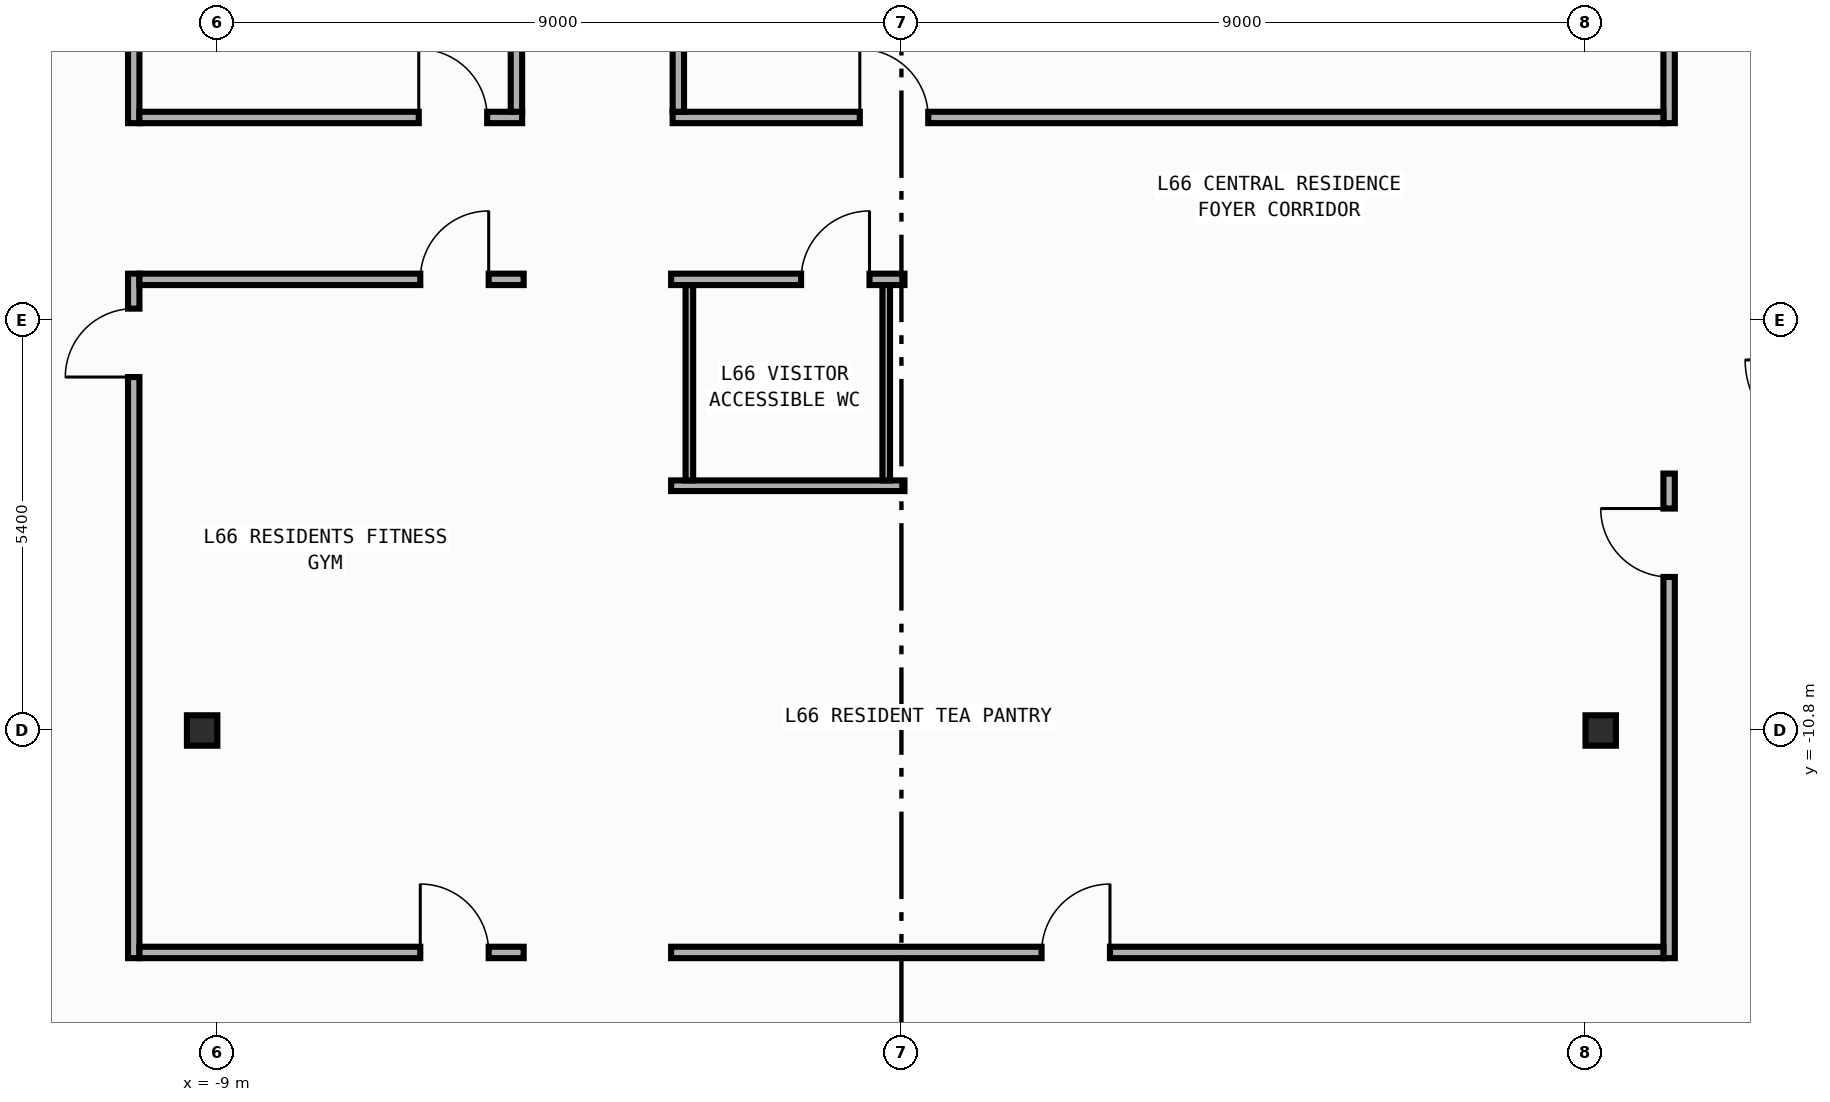
"""IFC4 building model, lengths in metres.
Left out: names, types, materials, properties, quantities, classifications, styles, units other than length and angle.
Written with IfcOpenShell. Run it as: python <this file> out.ifc"""

import sys

from ifc_helpers import new_model, si_unit, direction, frame, frame_2d, origin, origin_2d, place, context, subcontext, project, spatial, rectangle, i_section, extrude, element, fill, save


model = new_model("IFC4")
c1 = context("Model", 3, precision=1e-05, world=origin(), true_north=direction((0.0, 1.0)))
c2 = subcontext(c1, "Body", "Model", "MODEL_VIEW")
j1 = project(units=[si_unit("LENGTHUNIT", "METRE"), si_unit("PLANEANGLEUNIT", "RADIAN")], contexts=[c1])
p1 = place(None, origin())
s1 = spatial("IfcSite", under=j1, at=p1, CompositionType="ELEMENT")
p2 = place(p1, origin())
s2 = spatial("IfcBuilding", under=s1, at=p2, CompositionType="ELEMENT")
p3 = place(p2, frame((0.0, 0.0, 277.6)))
s3 = spatial("IfcBuildingStorey", under=s2, at=p3, CompositionType="ELEMENT", Elevation=277.6)
for number, where, z_axis, x_axis in (
    (1, (-9.2, -10.8, 0.0), (0.0, 0.0, 1.0), (1.0, 0.0, 0.0)),
    (2, (9.2, -10.8, 0.0), (0.0, 0.0, 1.0), (1.0, 0.0, 0.0)),
):
    element("IfcColumn", number, at=place(p3, frame(where, z_axis=z_axis, x_axis=x_axis)), inside=s3, PredefinedType="COLUMN", context=c2, shape_type="SweptSolid", body=[
        extrude(i_section(OverallWidth=0.4, OverallDepth=0.4, WebThickness=0.013, FlangeThickness=0.021, FilletRadius=0.022, at=origin_2d()), origin(), (0.0, 0.0, 1.0), 3.8),
    ])
p4 = place(p3, frame((-10.1, -2.81, 0.0), z_axis=(0.0, 0.0, 1.0), x_axis=(0.0, 1.0, 0.0)))
e3 = element("IfcWall", 3, at=p4, inside=s3, PredefinedType="PARTITIONING", context=c2, shape_type="SweptSolid", body=[
    extrude(rectangle(XDim=16.605, YDim=0.15, at=frame_2d((8.302, 0.0))), origin(), (0.0, 0.0, 1.0), 3.54),
])
p5 = place(p4, frame((7.751, 0.0, 0.0)))
e4 = element("IfcOpeningElement", 4, at=p5, cuts=e3, PredefinedType="OPENING", context=c2, shape_type="SweptSolid", body=[
    extrude(rectangle(XDim=0.9, YDim=2.15, at=frame_2d((0.45, 1.075))), frame((0.0, 0.085, 0.0), z_axis=(0.0, -1.0, 0.0), x_axis=(1.0, 0.0, 0.0)), (0.0, 0.0, 1.0), 0.17),
])
p6 = place(p3, frame((-10.1, -13.795, 0.0), z_axis=(0.0, 0.0, 1.0), x_axis=(0.0, 1.0, 0.0)))
e5 = element("IfcWall", 5, at=p6, inside=s3, PredefinedType="PARTITIONING", context=c2, shape_type="SweptSolid", body=[
    extrude(rectangle(XDim=9.005, YDim=0.15, at=frame_2d((4.502, 0.0))), origin(), (0.0, 0.0, 1.0), 3.54),
])
p7 = place(p6, frame((7.645, 0.0, 0.0)))
e6 = element("IfcOpeningElement", 6, at=p7, cuts=e5, PredefinedType="OPENING", context=c2, shape_type="SweptSolid", body=[
    extrude(rectangle(XDim=0.9, YDim=2.15, at=frame_2d((0.45, 1.075))), frame((0.0, 0.085, 0.0), z_axis=(0.0, -1.0, 0.0), x_axis=(1.0, 0.0, 0.0)), (0.0, 0.0, 1.0), 0.17),
])
p8 = place(p3, frame((10.1, -2.81, 0.0), z_axis=(0.0, 0.0, 1.0), x_axis=(0.0, 1.0, 0.0)))
e7 = element("IfcWall", 7, at=p8, inside=s3, PredefinedType="PARTITIONING", context=c2, shape_type="SweptSolid", body=[
    extrude(rectangle(XDim=16.69, YDim=0.15, at=frame_2d((8.345, 0.0))), origin(), (0.0, 0.0, 1.0), 3.54),
])
p9 = place(p8, frame((7.694, 0.0, 0.0)))
e8 = element("IfcOpeningElement", 8, at=p9, cuts=e7, PredefinedType="OPENING", context=c2, shape_type="SweptSolid", body=[
    extrude(rectangle(XDim=0.9, YDim=2.15, at=frame_2d((0.45, 1.075))), frame((0.0, 0.085, 0.0), z_axis=(0.0, -1.0, 0.0), x_axis=(1.0, 0.0, 0.0)), (0.0, 0.0, 1.0), 0.17),
])
p10 = place(p3, frame((10.1, -13.795, 0.0), z_axis=(0.0, 0.0, 1.0), x_axis=(0.0, 1.0, 0.0)))
e9 = element("IfcWall", 9, at=p10, inside=s3, PredefinedType="PARTITIONING", context=c2, shape_type="SweptSolid", body=[
    extrude(rectangle(XDim=6.375, YDim=0.15, at=frame_2d((3.188, 0.0))), origin(), (0.0, 0.0, 1.0), 3.54),
])
p11 = place(p10, frame((5.015, 0.0, 0.0)))
e10 = element("IfcOpeningElement", 10, at=p11, cuts=e9, PredefinedType="OPENING", context=c2, shape_type="SweptSolid", body=[
    extrude(rectangle(XDim=0.9, YDim=2.15, at=frame_2d((0.45, 1.075))), frame((0.0, 0.085, 0.0), z_axis=(0.0, -1.0, 0.0), x_axis=(1.0, 0.0, 0.0)), (0.0, 0.0, 1.0), 0.17),
])
p12 = place(p3, frame((-10.025, -2.735, 0.0), z_axis=(0.0, 0.0, 1.0), x_axis=(1.0, 0.0, 0.0)))
e11 = element("IfcWall", 11, at=p12, inside=s3, PredefinedType="PARTITIONING", context=c2, shape_type="SweptSolid", body=[
    extrude(rectangle(XDim=5.035, YDim=0.15, at=frame_2d((2.518, 0.0))), origin(), (0.0, 0.0, 1.0), 3.54),
])
p13 = place(p12, frame((3.675, 0.0, 0.0)))
e12 = element("IfcOpeningElement", 12, at=p13, cuts=e11, PredefinedType="OPENING", context=c2, shape_type="SweptSolid", body=[
    extrude(rectangle(XDim=0.9, YDim=2.15, at=frame_2d((0.45, 1.075))), frame((0.0, 0.085, 0.0), z_axis=(0.0, -1.0, 0.0), x_axis=(1.0, 0.0, 0.0)), (0.0, 0.0, 1.0), 0.17),
])
p14 = place(p3, frame((-10.025, -4.865, 0.0), z_axis=(0.0, 0.0, 1.0), x_axis=(1.0, 0.0, 0.0)))
e13 = element("IfcWall", 13, at=p14, inside=s3, PredefinedType="PARTITIONING", context=c2, shape_type="SweptSolid", body=[
    extrude(rectangle(XDim=5.055, YDim=0.15, at=frame_2d((2.527, 0.0))), origin(), (0.0, 0.0, 1.0), 3.54),
])
p15 = place(p14, frame((3.695, 0.0, 0.0)))
e14 = element("IfcOpeningElement", 14, at=p15, cuts=e13, PredefinedType="OPENING", context=c2, shape_type="SweptSolid", body=[
    extrude(rectangle(XDim=0.9, YDim=2.15, at=frame_2d((0.45, 1.075))), frame((0.0, 0.085, 0.0), z_axis=(0.0, -1.0, 0.0), x_axis=(1.0, 0.0, 0.0)), (0.0, 0.0, 1.0), 0.17),
])
p16 = place(p3, frame((-3.01, -2.735, 0.0), z_axis=(0.0, 0.0, 1.0), x_axis=(1.0, 0.0, 0.0)))
e15 = element("IfcWall", 15, at=p16, inside=s3, PredefinedType="PARTITIONING", context=c2, shape_type="SweptSolid", body=[
    extrude(rectangle(XDim=13.035, YDim=0.15, at=frame_2d((6.518, 0.0))), origin(), (0.0, 0.0, 1.0), 3.54),
])
p17 = place(p16, frame((2.463, 0.0, 0.0)))
e16 = element("IfcOpeningElement", 16, at=p17, cuts=e15, PredefinedType="OPENING", context=c2, shape_type="SweptSolid", body=[
    extrude(rectangle(XDim=0.9, YDim=2.15, at=frame_2d((0.45, 1.075))), frame((0.0, 0.085, 0.0), z_axis=(0.0, -1.0, 0.0), x_axis=(1.0, 0.0, 0.0)), (0.0, 0.0, 1.0), 0.17),
])
p18 = place(p3, frame((-3.03, -4.865, 0.0), z_axis=(0.0, 0.0, 1.0), x_axis=(1.0, 0.0, 0.0)))
e17 = element("IfcWall", 17, at=p18, inside=s3, PredefinedType="PARTITIONING", context=c2, shape_type="SweptSolid", body=[
    extrude(rectangle(XDim=3.07, YDim=0.15, at=frame_2d((1.535, 0.0))), origin(), (0.0, 0.0, 1.0), 3.54),
])
p19 = place(p18, frame((1.71, 0.0, 0.0)))
e18 = element("IfcOpeningElement", 18, at=p19, cuts=e17, PredefinedType="OPENING", context=c2, shape_type="SweptSolid", body=[
    extrude(rectangle(XDim=0.9, YDim=2.15, at=frame_2d((0.45, 1.075))), frame((0.0, 0.085, 0.0), z_axis=(0.0, -1.0, 0.0), x_axis=(1.0, 0.0, 0.0)), (0.0, 0.0, 1.0), 0.17),
])
p20 = place(p3, frame((-5.065, -2.66, 0.0), z_axis=(0.0, 0.0, 1.0), x_axis=(0.0, 1.0, 0.0)))
e19 = element("IfcWall", 19, at=p20, inside=s3, PredefinedType="PARTITIONING", context=c2, shape_type="SweptSolid", body=[
    extrude(rectangle(XDim=16.455, YDim=0.15, at=frame_2d((8.228, 0.0))), origin(), (0.0, 0.0, 1.0), 3.19),
])
p21 = place(p20, frame((7.677, 0.0, 0.0)))
e20 = element("IfcOpeningElement", 20, at=p21, cuts=e19, PredefinedType="OPENING", context=c2, shape_type="SweptSolid", body=[
    extrude(rectangle(XDim=0.9, YDim=2.15, at=frame_2d((0.45, 1.075))), frame((0.0, 0.085, 0.0), z_axis=(0.0, -1.0, 0.0), x_axis=(1.0, 0.0, 0.0)), (0.0, 0.0, 1.0), 0.17),
])
p22 = place(p3, frame((-2.935, -2.66, 0.0), z_axis=(0.0, 0.0, 1.0), x_axis=(0.0, 1.0, 0.0)))
e21 = element("IfcWall", 21, at=p22, inside=s3, PredefinedType="PARTITIONING", context=c2, shape_type="SweptSolid", body=[
    extrude(rectangle(XDim=16.455, YDim=0.15, at=frame_2d((8.228, 0.0))), origin(), (0.0, 0.0, 1.0), 3.54),
])
p23 = place(p22, frame((7.677, 0.0, 0.0)))
e22 = element("IfcOpeningElement", 22, at=p23, cuts=e21, PredefinedType="OPENING", context=c2, shape_type="SweptSolid", body=[
    extrude(rectangle(XDim=0.9, YDim=2.15, at=frame_2d((0.45, 1.075))), frame((0.0, 0.085, 0.0), z_axis=(0.0, -1.0, 0.0), x_axis=(1.0, 0.0, 0.0)), (0.0, 0.0, 1.0), 0.17),
])
p24 = place(p3, frame((-10.025, -13.72, 0.0), z_axis=(0.0, 0.0, 1.0), x_axis=(1.0, 0.0, 0.0)))
e23 = element("IfcWall", 23, at=p24, inside=s3, PredefinedType="PARTITIONING", context=c2, shape_type="SweptSolid", body=[
    extrude(rectangle(XDim=5.055, YDim=0.15, at=frame_2d((2.527, 0.0))), origin(), (0.0, 0.0, 1.0), 3.54),
])
p25 = place(p24, frame((3.695, 0.0, 0.0)))
e24 = element("IfcOpeningElement", 24, at=p25, cuts=e23, PredefinedType="OPENING", context=c2, shape_type="SweptSolid", body=[
    extrude(rectangle(XDim=0.9, YDim=2.15, at=frame_2d((0.45, 1.075))), frame((0.0, 0.085, 0.0), z_axis=(0.0, -1.0, 0.0), x_axis=(1.0, 0.0, 0.0)), (0.0, 0.0, 1.0), 0.17),
])
p26 = place(p3, frame((-3.03, -13.72, 0.0), z_axis=(0.0, 0.0, 1.0), x_axis=(1.0, 0.0, 0.0)))
e25 = element("IfcWall", 25, at=p26, inside=s3, PredefinedType="PARTITIONING", context=c2, shape_type="SweptSolid", body=[
    extrude(rectangle(XDim=13.055, YDim=0.15, at=frame_2d((6.527, 0.0))), origin(), (0.0, 0.0, 1.0), 3.54),
])
p27 = place(p26, frame((4.874, 0.0, 0.0)))
e26 = element("IfcOpeningElement", 26, at=p27, cuts=e25, PredefinedType="OPENING", context=c2, shape_type="SweptSolid", body=[
    extrude(rectangle(XDim=0.9, YDim=2.15, at=frame_2d((0.45, 1.075))), frame((0.0, 0.085, 0.0), z_axis=(0.0, -1.0, 0.0), x_axis=(1.0, 0.0, 0.0)), (0.0, 0.0, 1.0), 0.17),
])
p28 = place(p3, frame((-3.03, -7.58, 0.0), z_axis=(0.0, 0.0, 1.0), x_axis=(1.0, 0.0, 0.0)))
e27 = element("IfcWall", 27, at=p28, inside=s3, PredefinedType="PARTITIONING", context=c2, shape_type="SweptSolid", body=[
    extrude(rectangle(XDim=3.07, YDim=0.14, at=frame_2d((1.535, 0.0))), origin(), (0.0, 0.0, 1.0), 3.54),
])
for number, where, z_axis, x_axis in (
    (28, (-0.2, -4.94, 0.0), (0.0, 0.0, 1.0), (0.0, -1.0, 0.0)),
    (29, (-2.79, -7.51, 0.0), (0.0, 0.0, 1.0), (0.0, 1.0, 0.0)),
):
    element("IfcWall", number, at=place(p3, frame(where, z_axis=z_axis, x_axis=x_axis)), inside=s3, PredefinedType="PARTITIONING", context=c2, shape_type="SweptSolid", body=[
        extrude(rectangle(XDim=2.57, YDim=0.1, at=frame_2d((1.285, 0.0))), origin(), (0.0, 0.0, 1.0), 3.54),
    ])
p29 = place(p7, origin())
e30 = element("IfcDoor", 30, at=p29, inside=s3, OperationType="SINGLE_SWING_LEFT", PredefinedType="DOOR", context=c2, shape_type="SweptSolid", body=[
    extrude(rectangle(XDim=0.9, YDim=2.15, at=frame_2d((0.45, 1.075))), frame((0.0, 0.025, 0.0), z_axis=(0.0, -1.0, 0.0), x_axis=(1.0, 0.0, 0.0)), (0.0, 0.0, 1.0), 0.05),
])
fill(e6, e30)
p30 = place(p11, origin())
e31 = element("IfcDoor", 31, at=p30, inside=s3, OperationType="SINGLE_SWING_RIGHT", PredefinedType="DOOR", context=c2, shape_type="SweptSolid", body=[
    extrude(rectangle(XDim=0.9, YDim=2.15, at=frame_2d((0.45, 1.075))), frame((0.0, 0.025, 0.0), z_axis=(0.0, -1.0, 0.0), x_axis=(1.0, 0.0, 0.0)), (0.0, 0.0, 1.0), 0.05),
])
fill(e10, e31)
p31 = place(p13, origin())
e32 = element("IfcDoor", 32, at=p31, inside=s3, OperationType="SINGLE_SWING_LEFT", PredefinedType="DOOR", context=c2, shape_type="SweptSolid", body=[
    extrude(rectangle(XDim=0.9, YDim=2.15, at=frame_2d((0.45, 1.075))), frame((0.0, 0.025, 0.0), z_axis=(0.0, -1.0, 0.0), x_axis=(1.0, 0.0, 0.0)), (0.0, 0.0, 1.0), 0.05),
])
fill(e12, e32)
p32 = place(p15, origin())
e33 = element("IfcDoor", 33, at=p32, inside=s3, OperationType="SINGLE_SWING_RIGHT", PredefinedType="DOOR", context=c2, shape_type="SweptSolid", body=[
    extrude(rectangle(XDim=0.9, YDim=2.15, at=frame_2d((0.45, 1.075))), frame((0.0, 0.025, 0.0), z_axis=(0.0, -1.0, 0.0), x_axis=(1.0, 0.0, 0.0)), (0.0, 0.0, 1.0), 0.05),
])
fill(e14, e33)
p33 = place(p17, origin())
e34 = element("IfcDoor", 34, at=p33, inside=s3, OperationType="SINGLE_SWING_LEFT", PredefinedType="DOOR", context=c2, shape_type="SweptSolid", body=[
    extrude(rectangle(XDim=0.9, YDim=2.15, at=frame_2d((0.45, 1.075))), frame((0.0, 0.025, 0.0), z_axis=(0.0, -1.0, 0.0), x_axis=(1.0, 0.0, 0.0)), (0.0, 0.0, 1.0), 0.05),
])
fill(e16, e34)
p34 = place(p19, origin())
e35 = element("IfcDoor", 35, at=p34, inside=s3, OperationType="SINGLE_SWING_RIGHT", PredefinedType="DOOR", context=c2, shape_type="SweptSolid", body=[
    extrude(rectangle(XDim=0.9, YDim=2.15, at=frame_2d((0.45, 1.075))), frame((0.0, 0.025, 0.0), z_axis=(0.0, -1.0, 0.0), x_axis=(1.0, 0.0, 0.0)), (0.0, 0.0, 1.0), 0.05),
])
fill(e18, e35)
p35 = place(p25, origin())
e36 = element("IfcDoor", 36, at=p35, inside=s3, OperationType="SINGLE_SWING_LEFT", PredefinedType="DOOR", context=c2, shape_type="SweptSolid", body=[
    extrude(rectangle(XDim=0.9, YDim=2.15, at=frame_2d((0.45, 1.075))), frame((0.0, 0.025, 0.0), z_axis=(0.0, -1.0, 0.0), x_axis=(1.0, 0.0, 0.0)), (0.0, 0.0, 1.0), 0.05),
])
fill(e24, e36)
p36 = place(p27, origin())
e37 = element("IfcDoor", 37, at=p36, inside=s3, OperationType="SINGLE_SWING_RIGHT", PredefinedType="DOOR", context=c2, shape_type="SweptSolid", body=[
    extrude(rectangle(XDim=0.9, YDim=2.15, at=frame_2d((0.45, 1.075))), frame((0.0, 0.025, 0.0), z_axis=(0.0, -1.0, 0.0), x_axis=(1.0, 0.0, 0.0)), (0.0, 0.0, 1.0), 0.05),
])
fill(e26, e37)
save(model, sys.argv[1])
